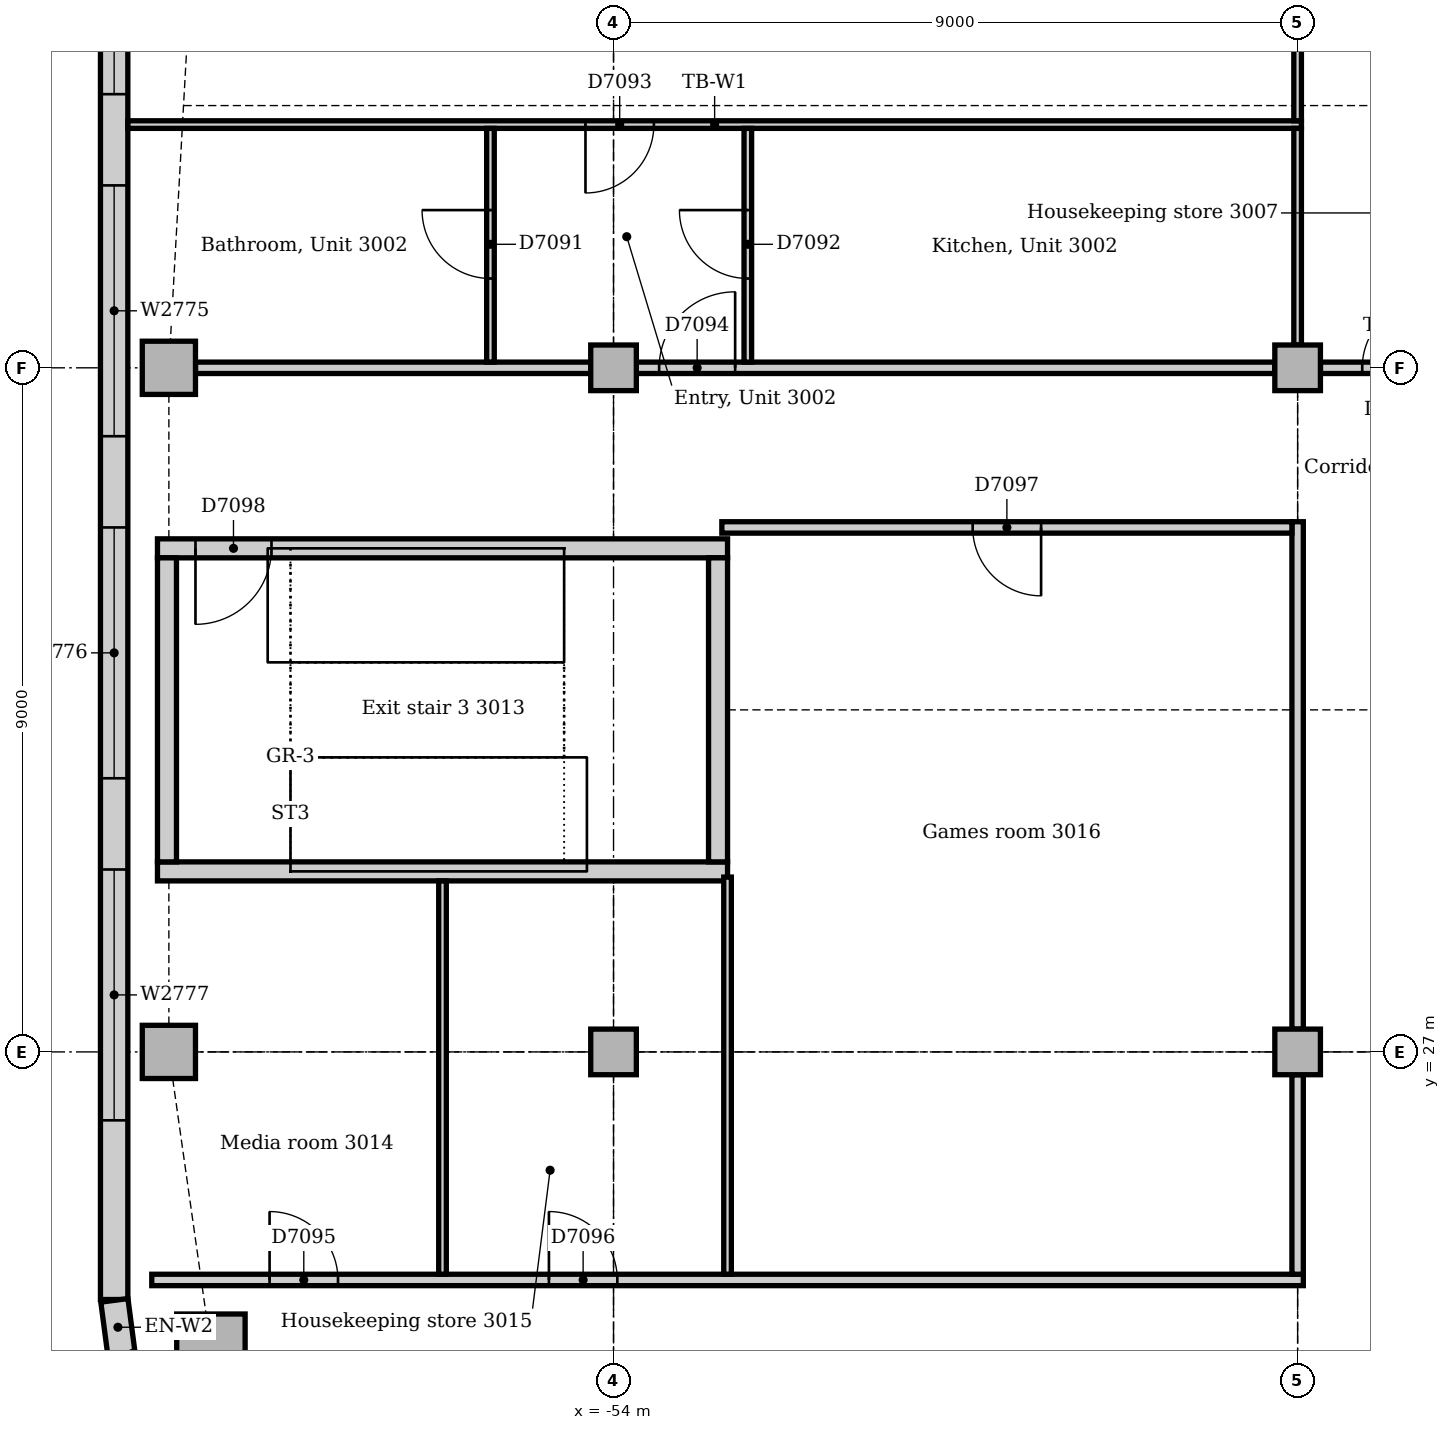
"""IFC4 building model, lengths in metres.
Left out: names, types, materials, properties, quantities, classifications, styles, units other than length and angle.
Written with IfcOpenShell. Run it as: python <this file> out.ifc"""

import sys

from ifc_helpers import new_model, si_unit, direction, frame, frame_2d, origin, origin_2d, place, context, subcontext, project, spatial, rectangle, extrude, element, fill, save


model = new_model("IFC4")
c1 = context("Model", 3, precision=1e-05, world=origin(), true_north=direction((0.0, 1.0)))
c2 = subcontext(c1, "Body", "Model", "MODEL_VIEW")
j1 = project(units=[si_unit("LENGTHUNIT", "METRE"), si_unit("PLANEANGLEUNIT", "RADIAN")], contexts=[c1])
p1 = place(None, origin())
s1 = spatial("IfcSite", under=j1, at=p1, CompositionType="ELEMENT")
p2 = place(p1, origin())
s2 = spatial("IfcBuilding", under=s1, at=p2, CompositionType="ELEMENT")
p3 = place(p2, frame((0.0, 0.0, 128.0)))
s3 = spatial("IfcBuildingStorey", under=s2, at=p3, CompositionType="ELEMENT", Elevation=128.0)
p4 = place(p3, frame((-60.0, 29.375, 0.0), z_axis=(0.0, 0.0, 1.0), x_axis=(1.0, 0.0, 0.0)))
e1 = element("IfcWall", 1, at=p4, inside=s3, PredefinedType="SOLIDWALL", context=c2, shape_type="SweptSolid", body=[
    extrude(rectangle(XDim=7.5, YDim=0.25, at=frame_2d((3.75, 0.0))), origin(), (0.0, 0.0, 1.0), 4.0),
])
p5 = place(p3, frame((-52.5, 33.625, 0.0), z_axis=(0.0, 0.0, 1.0), x_axis=(-1.0, 0.0, 0.0)))
e2 = element("IfcWall", 2, at=p5, inside=s3, PredefinedType="SOLIDWALL", context=c2, shape_type="SweptSolid", body=[
    extrude(rectangle(XDim=7.5, YDim=0.25, at=frame_2d((3.75, 0.0))), origin(), (0.0, 0.0, 1.0), 4.0),
])
p6 = place(p5, frame((6.0, 0.0, 0.0)))
e3 = element("IfcOpeningElement", 3, at=p6, cuts=e2, PredefinedType="OPENING", context=c2, shape_type="SweptSolid", body=[
    extrude(rectangle(XDim=1.0, YDim=2.1, at=frame_2d((0.5, 1.05))), frame((0.0, 0.135, 0.0), z_axis=(0.0, -1.0, 0.0), x_axis=(1.0, 0.0, 0.0)), (0.0, 0.0, 1.0), 0.27),
])
for number, where, z_axis, x_axis in (
    (4, (-52.625, 29.5, 0.0), (0.0, 0.0, 1.0), (0.0, 1.0, 0.0)),
    (5, (-59.875, 33.5, 0.0), (0.0, 0.0, 1.0), (0.0, -1.0, 0.0)),
):
    element("IfcWall", number, at=place(p3, frame(where, z_axis=z_axis, x_axis=x_axis)), inside=s3, PredefinedType="SOLIDWALL", context=c2, shape_type="SweptSolid", body=[
        extrude(rectangle(XDim=4.0, YDim=0.25, at=frame_2d((2.0, 0.0))), origin(), (0.0, 0.0, 1.0), 4.0),
    ])
p7 = place(p3, frame((-59.297, 23.102, 0.0), z_axis=(0.0, 0.0, 1.0), x_axis=(1.0, 0.0, 0.0)))
e6 = element("IfcColumn", 6, at=p7, inside=s3, PredefinedType="COLUMN", context=c2, shape_type="SweptSolid", body=[
    extrude(rectangle(XDim=0.9, YDim=0.9, at=origin_2d()), origin(), (0.0, 0.0, 1.0), 3.85),
])
for number, where, z_axis, x_axis in (
    (7, (-59.85, 27.0, 0.0), (0.0, 0.0, 1.0), (1.0, 0.0, 0.0)),
    (8, (-59.85, 36.0, 0.0), (0.0, 0.0, 1.0), (1.0, 0.0, 0.0)),
):
    element("IfcColumn", number, at=place(p3, frame(where, z_axis=z_axis, x_axis=x_axis)), inside=s3, PredefinedType="COLUMN", context=c2, shape_type="SweptSolid", body=[
        extrude(rectangle(XDim=0.7, YDim=0.7, at=origin_2d()), origin(), (0.0, 0.0, 1.0), 3.85),
    ])
for number, where, z_axis, x_axis in (
    (9, (-54.0, 27.0, 0.0), (0.0, 0.0, 1.0), (1.0, 0.0, 0.0)),
    (10, (-54.0, 36.0, 0.0), (0.0, 0.0, 1.0), (1.0, 0.0, 0.0)),
    (11, (-45.0, 27.0, 0.0), (0.0, 0.0, 1.0), (1.0, 0.0, 0.0)),
    (12, (-45.0, 36.0, 0.0), (0.0, 0.0, 1.0), (1.0, 0.0, 0.0)),
):
    element("IfcColumn", number, at=place(p3, frame(where, z_axis=z_axis, x_axis=x_axis)), inside=s3, PredefinedType="COLUMN", context=c2, shape_type="SweptSolid", body=[
        extrude(rectangle(XDim=0.6, YDim=0.6, at=origin_2d()), origin(), (0.0, 0.0, 1.0), 3.85),
    ])
p8 = place(p3, frame((-60.57, 45.257, 0.0), z_axis=(0.0, 0.0, 1.0), x_axis=(0.0, -1.0, 0.0)))
e13 = element("IfcWall", 13, at=p8, inside=s3, PredefinedType="STANDARD", context=c2, shape_type="SweptSolid", body=[
    extrude(rectangle(XDim=21.515, YDim=0.36, at=frame_2d((10.757, 0.0))), origin(), (0.0, 0.0, 1.0), 3.85),
])
p9 = place(p8, frame((2.357, 0.0, 0.9)))
e14 = element("IfcOpeningElement", 14, at=p9, cuts=e13, PredefinedType="OPENING", context=c2, shape_type="SweptSolid", body=[
    extrude(rectangle(XDim=3.3, YDim=1.6, at=frame_2d((1.65, 0.8))), frame((0.0, 0.19, 0.0), z_axis=(0.0, -1.0, 0.0), x_axis=(1.0, 0.0, 0.0)), (0.0, 0.0, 1.0), 0.38),
])
p10 = place(p8, frame((6.857, 0.0, 0.9)))
e15 = element("IfcOpeningElement", 15, at=p10, cuts=e13, PredefinedType="OPENING", context=c2, shape_type="SweptSolid", body=[
    extrude(rectangle(XDim=3.3, YDim=1.6, at=frame_2d((1.65, 0.8))), frame((0.0, 0.19, 0.0), z_axis=(0.0, -1.0, 0.0), x_axis=(1.0, 0.0, 0.0)), (0.0, 0.0, 1.0), 0.38),
])
p11 = place(p8, frame((11.357, 0.0, 0.9)))
e16 = element("IfcOpeningElement", 16, at=p11, cuts=e13, PredefinedType="OPENING", context=c2, shape_type="SweptSolid", body=[
    extrude(rectangle(XDim=3.3, YDim=1.6, at=frame_2d((1.65, 0.8))), frame((0.0, 0.19, 0.0), z_axis=(0.0, -1.0, 0.0), x_axis=(1.0, 0.0, 0.0)), (0.0, 0.0, 1.0), 0.38),
])
p12 = place(p8, frame((15.857, 0.0, 0.9)))
e17 = element("IfcOpeningElement", 17, at=p12, cuts=e13, PredefinedType="OPENING", context=c2, shape_type="SweptSolid", body=[
    extrude(rectangle(XDim=3.3, YDim=1.6, at=frame_2d((1.65, 0.8))), frame((0.0, 0.19, 0.0), z_axis=(0.0, -1.0, 0.0), x_axis=(1.0, 0.0, 0.0)), (0.0, 0.0, 1.0), 0.38),
])
p13 = place(p3, frame((-60.567, 23.731, 0.0), z_axis=(0.0, 0.0, 1.0), x_axis=(0.13055608231, -0.99144092581, 0.0)))
e18 = element("IfcWall", 18, at=p13, inside=s3, PredefinedType="STANDARD", context=c2, shape_type="SweptSolid", body=[
    extrude(rectangle(XDim=0.713, YDim=0.36, at=frame_2d((0.356, 0.0))), origin(), (0.0, 0.0, 1.0), 3.85),
])
p14 = place(p3, frame((-44.7, 36.0, 0.0), z_axis=(0.0, 0.0, 1.0), x_axis=(1.0, 0.0, 0.0)))
e19 = element("IfcWall", 19, at=p14, inside=s3, PredefinedType="PARTITIONING", context=c2, shape_type="SweptSolid", body=[
    extrude(rectangle(XDim=1.975, YDim=0.15, at=frame_2d((0.988, 0.0))), origin(), (0.0, 0.0, 1.0), 3.602),
])
p15 = place(p14, frame((0.55, 0.0, 0.0)))
e20 = element("IfcOpeningElement", 20, at=p15, cuts=e19, PredefinedType="OPENING", context=c2, shape_type="SweptSolid", body=[
    extrude(rectangle(XDim=0.9, YDim=2.1, at=frame_2d((0.45, 1.05))), frame((0.0, 0.085, 0.0), z_axis=(0.0, -1.0, 0.0), x_axis=(1.0, 0.0, 0.0)), (0.0, 0.0, 1.0), 0.17),
])
p16 = place(p3, frame((-53.7, 36.0, 0.0), z_axis=(0.0, 0.0, 1.0), x_axis=(1.0, 0.0, 0.0)))
e21 = element("IfcWall", 21, at=p16, inside=s3, PredefinedType="PARTITIONING", context=c2, shape_type="SweptSolid", body=[
    extrude(rectangle(XDim=8.4, YDim=0.15, at=frame_2d((4.2, 0.0))), origin(), (0.0, 0.0, 1.0), 3.262),
])
p17 = place(p16, frame((0.3, 0.0, 0.0)))
e22 = element("IfcOpeningElement", 22, at=p17, cuts=e21, PredefinedType="OPENING", context=c2, shape_type="SweptSolid", body=[
    extrude(rectangle(XDim=1.0, YDim=2.1, at=frame_2d((0.5, 1.05))), frame((0.0, 0.085, 0.0), z_axis=(0.0, -1.0, 0.0), x_axis=(1.0, 0.0, 0.0)), (0.0, 0.0, 1.0), 0.17),
])
p18 = place(p3, frame((-59.5, 36.0, 0.0), z_axis=(0.0, 0.0, 1.0), x_axis=(1.0, 0.0, 0.0)))
e23 = element("IfcWall", 23, at=p18, inside=s3, PredefinedType="PARTITIONING", context=c2, shape_type="SweptSolid", body=[
    extrude(rectangle(XDim=5.2, YDim=0.15, at=frame_2d((2.6, 0.0))), origin(), (0.0, 0.0, 1.0), 3.35),
])
p19 = place(p3, frame((-60.075, 24.0, 0.0), z_axis=(0.0, 0.0, 1.0), x_axis=(1.0, 0.0, 0.0)))
e24 = element("IfcWall", 24, at=p19, inside=s3, PredefinedType="PARTITIONING", context=c2, shape_type="SweptSolid", body=[
    extrude(rectangle(XDim=15.15, YDim=0.15, at=frame_2d((7.575, 0.0))), origin(), (0.0, 0.0, 1.0), 3.85),
])
p20 = place(p19, frame((1.55, 0.0, 0.0)))
e25 = element("IfcOpeningElement", 25, at=p20, cuts=e24, PredefinedType="OPENING", context=c2, shape_type="SweptSolid", body=[
    extrude(rectangle(XDim=0.9, YDim=2.1, at=frame_2d((0.45, 1.05))), frame((0.0, 0.085, 0.0), z_axis=(0.0, -1.0, 0.0), x_axis=(1.0, 0.0, 0.0)), (0.0, 0.0, 1.0), 0.17),
])
p21 = place(p19, frame((5.225, 0.0, 0.0)))
e26 = element("IfcOpeningElement", 26, at=p21, cuts=e24, PredefinedType="OPENING", context=c2, shape_type="SweptSolid", body=[
    extrude(rectangle(XDim=0.9, YDim=2.1, at=frame_2d((0.45, 1.05))), frame((0.0, 0.085, 0.0), z_axis=(0.0, -1.0, 0.0), x_axis=(1.0, 0.0, 0.0)), (0.0, 0.0, 1.0), 0.17),
])
p22 = place(p3, frame((-45.0, 24.075, 0.0), z_axis=(0.0, 0.0, 1.0), x_axis=(0.0, 1.0, 0.0)))
e27 = element("IfcWall", 27, at=p22, inside=s3, PredefinedType="PARTITIONING", context=c2, shape_type="SweptSolid", body=[
    extrude(rectangle(XDim=2.625, YDim=0.15, at=frame_2d((1.312, 0.0))), origin(), (0.0, 0.0, 1.0), 3.362),
])
p23 = place(p3, frame((-45.0, 27.3, 0.0), z_axis=(0.0, 0.0, 1.0), x_axis=(0.0, 1.0, 0.0)))
e28 = element("IfcWall", 28, at=p23, inside=s3, PredefinedType="PARTITIONING", context=c2, shape_type="SweptSolid", body=[
    extrude(rectangle(XDim=6.675, YDim=0.15, at=frame_2d((3.337, 0.0))), origin(), (0.0, 0.0, 1.0), 3.362),
])
p24 = place(p3, frame((-52.575, 33.9, 0.0), z_axis=(0.0, 0.0, 1.0), x_axis=(1.0, 0.0, 0.0)))
e29 = element("IfcWall", 29, at=p24, inside=s3, PredefinedType="PARTITIONING", context=c2, shape_type="SweptSolid", body=[
    extrude(rectangle(XDim=7.5, YDim=0.15, at=frame_2d((3.75, 0.0))), origin(), (0.0, 0.0, 1.0), 3.85),
])
p25 = place(p24, frame((3.3, 0.0, 0.0)))
e30 = element("IfcOpeningElement", 30, at=p25, cuts=e29, PredefinedType="OPENING", context=c2, shape_type="SweptSolid", body=[
    extrude(rectangle(XDim=0.9, YDim=2.1, at=frame_2d((0.45, 1.05))), frame((0.0, 0.085, 0.0), z_axis=(0.0, -1.0, 0.0), x_axis=(1.0, 0.0, 0.0)), (0.0, 0.0, 1.0), 0.17),
])
p26 = place(p3, frame((-60.39, 39.2, 0.0), z_axis=(0.0, 0.0, 1.0), x_axis=(1.0, 0.0, 0.0)))
e31 = element("IfcWall", 31, at=p26, inside=s3, PredefinedType="PARTITIONING", context=c2, shape_type="SweptSolid", body=[
    extrude(rectangle(XDim=15.44, YDim=0.1, at=frame_2d((7.72, 0.0))), origin(), (0.0, 0.0, 1.0), 3.85),
])
p27 = place(p26, frame((6.021, 0.0, 0.0)))
e32 = element("IfcOpeningElement", 32, at=p27, cuts=e31, PredefinedType="OPENING", context=c2, shape_type="SweptSolid", body=[
    extrude(rectangle(XDim=0.9, YDim=2.1, at=frame_2d((0.45, 1.05))), frame((0.0, 0.06, 0.0), z_axis=(0.0, -1.0, 0.0), x_axis=(1.0, 0.0, 0.0)), (0.0, 0.0, 1.0), 0.12),
])
p28 = place(p3, frame((-45.0, 39.25, 0.0), z_axis=(0.0, 0.0, 1.0), x_axis=(0.0, 1.0, 0.0)))
e33 = element("IfcWall", 33, at=p28, inside=s3, PredefinedType="PARTITIONING", context=c2, shape_type="SweptSolid", body=[
    extrude(rectangle(XDim=6.8, YDim=0.1, at=frame_2d((3.4, 0.0))), origin(), (0.0, 0.0, 1.0), 3.362),
])
p29 = place(p3, frame((-45.0, 36.3, 0.0), z_axis=(0.0, 0.0, 1.0), x_axis=(0.0, 1.0, 0.0)))
e34 = element("IfcWall", 34, at=p29, inside=s3, PredefinedType="PARTITIONING", context=c2, shape_type="SweptSolid", body=[
    extrude(rectangle(XDim=2.85, YDim=0.1, at=frame_2d((1.425, 0.0))), origin(), (0.0, 0.0, 1.0), 3.362),
])
p30 = place(p3, frame((-56.25, 24.075, 0.0), z_axis=(0.0, 0.0, 1.0), x_axis=(0.0, 1.0, 0.0)))
e35 = element("IfcWall", 35, at=p30, inside=s3, PredefinedType="PARTITIONING", context=c2, shape_type="SweptSolid", body=[
    extrude(rectangle(XDim=5.175, YDim=0.1, at=frame_2d((2.587, 0.0))), origin(), (0.0, 0.0, 1.0), 3.85),
])
p31 = place(p3, frame((-52.5, 24.075, 0.0), z_axis=(0.0, 0.0, 1.0), x_axis=(0.0, 1.0, 0.0)))
e36 = element("IfcWall", 36, at=p31, inside=s3, PredefinedType="PARTITIONING", context=c2, shape_type="SweptSolid", body=[
    extrude(rectangle(XDim=5.225, YDim=0.1, at=frame_2d((2.612, 0.0))), origin(), (0.0, 0.0, 1.0), 3.85),
])
p32 = place(p3, frame((-55.619, 36.075, 0.0), z_axis=(0.0, 0.0, 1.0), x_axis=(0.0, 1.0, 0.0)))
e37 = element("IfcWall", 37, at=p32, inside=s3, PredefinedType="PARTITIONING", context=c2, shape_type="SweptSolid", body=[
    extrude(rectangle(XDim=3.075, YDim=0.1, at=frame_2d((1.538, 0.0))), origin(), (0.0, 0.0, 1.0), 3.85),
])
p33 = place(p32, frame((1.1, 0.0, 0.0)))
e38 = element("IfcOpeningElement", 38, at=p33, cuts=e37, PredefinedType="OPENING", context=c2, shape_type="SweptSolid", body=[
    extrude(rectangle(XDim=0.9, YDim=2.1, at=frame_2d((0.45, 1.05))), frame((0.0, 0.06, 0.0), z_axis=(0.0, -1.0, 0.0), x_axis=(1.0, 0.0, 0.0)), (0.0, 0.0, 1.0), 0.12),
])
p34 = place(p3, frame((-52.233, 36.075, 0.0), z_axis=(0.0, 0.0, 1.0), x_axis=(0.0, 1.0, 0.0)))
e39 = element("IfcWall", 39, at=p34, inside=s3, PredefinedType="PARTITIONING", context=c2, shape_type="SweptSolid", body=[
    extrude(rectangle(XDim=3.075, YDim=0.1, at=frame_2d((1.538, 0.0))), origin(), (0.0, 0.0, 1.0), 3.85),
])
p35 = place(p34, frame((1.1, 0.0, 0.0)))
e40 = element("IfcOpeningElement", 40, at=p35, cuts=e39, PredefinedType="OPENING", context=c2, shape_type="SweptSolid", body=[
    extrude(rectangle(XDim=0.9, YDim=2.1, at=frame_2d((0.45, 1.05))), frame((0.0, 0.06, 0.0), z_axis=(0.0, -1.0, 0.0), x_axis=(1.0, 0.0, 0.0)), (0.0, 0.0, 1.0), 0.12),
])
p36 = place(p9, origin())
e41 = element("IfcWindow", 41, at=p36, inside=s3, PartitioningType="SINGLE_PANEL", PredefinedType="WINDOW", context=c2, shape_type="SweptSolid", body=[
    extrude(rectangle(XDim=3.3, YDim=1.6, at=frame_2d((1.65, 0.8))), frame((0.0, 0.13, 0.0), z_axis=(0.0, -1.0, 0.0), x_axis=(1.0, 0.0, 0.0)), (0.0, 0.0, 1.0), 0.06),
])
fill(e14, e41)
p37 = place(p10, origin())
e42 = element("IfcWindow", 42, at=p37, inside=s3, PartitioningType="SINGLE_PANEL", PredefinedType="WINDOW", context=c2, shape_type="SweptSolid", body=[
    extrude(rectangle(XDim=3.3, YDim=1.6, at=frame_2d((1.65, 0.8))), frame((0.0, 0.13, 0.0), z_axis=(0.0, -1.0, 0.0), x_axis=(1.0, 0.0, 0.0)), (0.0, 0.0, 1.0), 0.06),
])
fill(e15, e42)
p38 = place(p11, origin())
e43 = element("IfcWindow", 43, at=p38, inside=s3, PartitioningType="SINGLE_PANEL", PredefinedType="WINDOW", context=c2, shape_type="SweptSolid", body=[
    extrude(rectangle(XDim=3.3, YDim=1.6, at=frame_2d((1.65, 0.8))), frame((0.0, 0.13, 0.0), z_axis=(0.0, -1.0, 0.0), x_axis=(1.0, 0.0, 0.0)), (0.0, 0.0, 1.0), 0.06),
])
fill(e16, e43)
p39 = place(p12, origin())
e44 = element("IfcWindow", 44, at=p39, inside=s3, PartitioningType="SINGLE_PANEL", PredefinedType="WINDOW", context=c2, shape_type="SweptSolid", body=[
    extrude(rectangle(XDim=3.3, YDim=1.6, at=frame_2d((1.65, 0.8))), frame((0.0, 0.13, 0.0), z_axis=(0.0, -1.0, 0.0), x_axis=(1.0, 0.0, 0.0)), (0.0, 0.0, 1.0), 0.06),
])
fill(e17, e44)
p40 = place(p15, origin())
e45 = element("IfcDoor", 45, at=p40, inside=s3, OperationType="SINGLE_SWING_RIGHT", PredefinedType="DOOR", context=c2, shape_type="SweptSolid", body=[
    extrude(rectangle(XDim=0.9, YDim=2.1, at=frame_2d((0.45, 1.05))), frame((0.0, 0.025, 0.0), z_axis=(0.0, -1.0, 0.0), x_axis=(1.0, 0.0, 0.0)), (0.0, 0.0, 1.0), 0.05),
])
fill(e20, e45)
p41 = place(p33, origin())
e46 = element("IfcDoor", 46, at=p41, inside=s3, OperationType="SINGLE_SWING_RIGHT", PredefinedType="DOOR", context=c2, shape_type="SweptSolid", body=[
    extrude(rectangle(XDim=0.9, YDim=2.1, at=frame_2d((0.45, 1.05))), frame((0.0, 0.025, 0.0), z_axis=(0.0, -1.0, 0.0), x_axis=(1.0, 0.0, 0.0)), (0.0, 0.0, 1.0), 0.05),
])
fill(e38, e46)
p42 = place(p35, origin())
e47 = element("IfcDoor", 47, at=p42, inside=s3, OperationType="SINGLE_SWING_RIGHT", PredefinedType="DOOR", context=c2, shape_type="SweptSolid", body=[
    extrude(rectangle(XDim=0.9, YDim=2.1, at=frame_2d((0.45, 1.05))), frame((0.0, 0.025, 0.0), z_axis=(0.0, -1.0, 0.0), x_axis=(1.0, 0.0, 0.0)), (0.0, 0.0, 1.0), 0.05),
])
fill(e40, e47)
p43 = place(p27, frame((0.9, 0.0, 0.0), z_axis=(0.0, 0.0, 1.0), x_axis=(-1.0, 0.0, 0.0)))
e48 = element("IfcDoor", 48, at=p43, inside=s3, OperationType="SINGLE_SWING_RIGHT", PredefinedType="DOOR", context=c2, shape_type="SweptSolid", body=[
    extrude(rectangle(XDim=0.9, YDim=2.1, at=frame_2d((0.45, 1.05))), frame((0.0, 0.025, 0.0), z_axis=(0.0, -1.0, 0.0), x_axis=(1.0, 0.0, 0.0)), (0.0, 0.0, 1.0), 0.05),
])
fill(e32, e48)
p44 = place(p17, origin())
e49 = element("IfcDoor", 49, at=p44, inside=s3, OperationType="SINGLE_SWING_RIGHT", PredefinedType="DOOR", context=c2, shape_type="SweptSolid", body=[
    extrude(rectangle(XDim=1.0, YDim=2.1, at=frame_2d((0.5, 1.05))), frame((0.0, 0.025, 0.0), z_axis=(0.0, -1.0, 0.0), x_axis=(1.0, 0.0, 0.0)), (0.0, 0.0, 1.0), 0.05),
])
fill(e22, e49)
p45 = place(p20, origin())
e50 = element("IfcDoor", 50, at=p45, inside=s3, OperationType="SINGLE_SWING_LEFT", PredefinedType="DOOR", context=c2, shape_type="SweptSolid", body=[
    extrude(rectangle(XDim=0.9, YDim=2.1, at=frame_2d((0.45, 1.05))), frame((0.0, 0.025, 0.0), z_axis=(0.0, -1.0, 0.0), x_axis=(1.0, 0.0, 0.0)), (0.0, 0.0, 1.0), 0.05),
])
fill(e25, e50)
p46 = place(p21, origin())
e51 = element("IfcDoor", 51, at=p46, inside=s3, OperationType="SINGLE_SWING_LEFT", PredefinedType="DOOR", context=c2, shape_type="SweptSolid", body=[
    extrude(rectangle(XDim=0.9, YDim=2.1, at=frame_2d((0.45, 1.05))), frame((0.0, 0.025, 0.0), z_axis=(0.0, -1.0, 0.0), x_axis=(1.0, 0.0, 0.0)), (0.0, 0.0, 1.0), 0.05),
])
fill(e26, e51)
p47 = place(p25, frame((0.9, 0.0, 0.0), z_axis=(0.0, 0.0, 1.0), x_axis=(-1.0, 0.0, 0.0)))
e52 = element("IfcDoor", 52, at=p47, inside=s3, OperationType="SINGLE_SWING_LEFT", PredefinedType="DOOR", context=c2, shape_type="SweptSolid", body=[
    extrude(rectangle(XDim=0.9, YDim=2.1, at=frame_2d((0.45, 1.05))), frame((0.0, 0.025, 0.0), z_axis=(0.0, -1.0, 0.0), x_axis=(1.0, 0.0, 0.0)), (0.0, 0.0, 1.0), 0.05),
])
fill(e30, e52)
p48 = place(p6, origin())
e53 = element("IfcDoor", 53, at=p48, inside=s3, OperationType="SINGLE_SWING_RIGHT", PredefinedType="DOOR", context=c2, shape_type="SweptSolid", body=[
    extrude(rectangle(XDim=1.0, YDim=2.1, at=frame_2d((0.5, 1.05))), frame((0.0, 0.025, 0.0), z_axis=(0.0, -1.0, 0.0), x_axis=(1.0, 0.0, 0.0)), (0.0, 0.0, 1.0), 0.05),
])
fill(e3, e53)
save(model, sys.argv[1])
